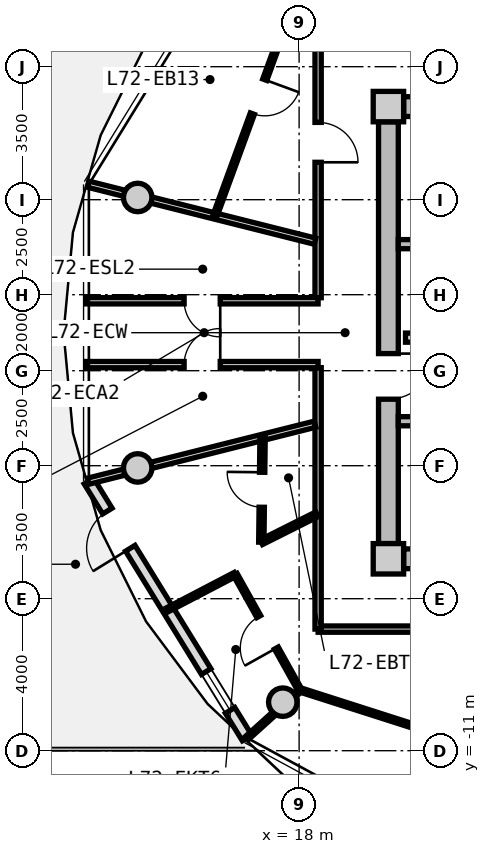
"""IFC4 building model, lengths in metres.
Left out: names, types, materials, properties, quantities, classifications, styles, units other than length and angle.
Written with IfcOpenShell. Run it as: python <this file> out.ifc"""

import sys

from ifc_helpers import new_model, si_unit, direction, frame, frame_2d, origin, origin_2d, place, context, subcontext, project, spatial, rectangle, circle, extrude, source, transform, mapped, element, fill, save


model = new_model("IFC4")
c1 = context("Model", 3, precision=1e-05, world=origin(), true_north=direction((0.0, 1.0)))
c2 = subcontext(c1, "Body", "Model", "MODEL_VIEW")
j1 = project(units=[si_unit("LENGTHUNIT", "METRE"), si_unit("PLANEANGLEUNIT", "RADIAN")], contexts=[c1])
p1 = place(None, origin())
s1 = spatial("IfcSite", under=j1, at=p1, CompositionType="ELEMENT")
p2 = place(p1, origin())
s2 = spatial("IfcBuilding", under=s1, at=p2, CompositionType="ELEMENT")
p3 = place(p2, frame((0.0, 0.0, 232.2)))
s3 = spatial("IfcBuildingStorey", under=s2, at=p3, CompositionType="ELEMENT", Elevation=232.2)
m1 = source(origin(), c2, "Body", "SweptSolid", [
    extrude(rectangle(XDim=0.8, YDim=0.8, at=origin_2d()), origin(), (0.0, 0.0, 1.0), 3.05),
])
for number, where, z_axis, x_axis in (
    (1, (20.35, -5.95, 0.0), (0.0, 0.0, 1.0), (1.0, 0.0, 0.0)),
    (2, (20.35, 5.95, 0.0), (0.0, 0.0, 1.0), (1.0, 0.0, 0.0)),
):
    element("IfcColumn", number, at=place(p3, frame(where, z_axis=z_axis, x_axis=x_axis)), inside=s3, PredefinedType="COLUMN", context=c2, shape_type="MappedRepresentation", body=[
        mapped(m1, transform((0.0, 0.0, 0.0), x_axis=(1.0, 0.0, 0.0), y_axis=(0.0, 1.0, 0.0), z_axis=(0.0, 0.0, 1.0), scale=1.0)),
    ])
m2 = source(origin(), c2, "Body", "SweptSolid", [
    extrude(rectangle(XDim=14.5, YDim=0.52, at=frame_2d((7.25, 0.0))), origin(), (0.0, 0.0, 1.0), 2.81),
])
for number, where, z_axis, x_axis in (
    (3, (20.75, 5.95, 0.0), (0.0, 0.0, 1.0), (1.0, 0.0, 0.0)),
    (4, (35.25, -5.95, 0.0), (0.0, 0.0, 1.0), (-1.0, 0.0, 0.0)),
):
    element("IfcWall", number, at=place(p3, frame(where, z_axis=z_axis, x_axis=x_axis)), inside=s3, PredefinedType="SHEAR", context=c2, shape_type="MappedRepresentation", body=[
        mapped(m2, transform((0.0, 0.0, 0.0), x_axis=(1.0, 0.0, 0.0), y_axis=(0.0, 1.0, 0.0), z_axis=(0.0, 0.0, 1.0), scale=1.0)),
    ])
m3 = source(origin(), c2, "Body", "SweptSolid", [
    extrude(rectangle(XDim=11.1, YDim=0.52, at=frame_2d((5.55, 0.0))), origin(), (0.0, 0.0, 1.0), 2.81),
])
p4 = place(p3, frame((20.35, -5.55, 0.0), z_axis=(0.0, 0.0, 1.0), x_axis=(0.0, 1.0, 0.0)))
e5 = element("IfcWall", 5, at=p4, inside=s3, PredefinedType="SHEAR", context=c2, shape_type="MappedRepresentation", body=[
    mapped(m3, transform((0.0, 0.0, 0.0), x_axis=(1.0, 0.0, 0.0), y_axis=(0.0, 1.0, 0.0), z_axis=(0.0, 0.0, 1.0), scale=1.0)),
])
p5 = place(p4, frame((3.8, 0.0, 0.0)))
e6 = element("IfcOpeningElement", 6, at=p5, cuts=e5, PredefinedType="OPENING", context=c2, shape_type="SweptSolid", body=[
    extrude(rectangle(XDim=1.2, YDim=2.15, at=frame_2d((0.6, 1.075))), frame((0.0, 0.27, 0.0), z_axis=(0.0, -1.0, 0.0), x_axis=(1.0, 0.0, 0.0)), (0.0, 0.0, 1.0), 0.54),
])
m4 = source(origin(), c2, "Body", "SweptSolid", [
    extrude(circle(Radius=0.375, at=origin_2d()), origin(), (0.0, 0.0, 1.0), 3.05),
])
for number, where, z_axis, x_axis in (
    (7, (13.753, 3.559, 0.0), (0.0, 0.0, 1.0), (1.0, 0.0, 0.0)),
    (8, (13.753, -3.559, 0.0), (0.0, 0.0, 1.0), (1.0, 0.0, 0.0)),
    (9, (17.57, -9.723, 0.0), (0.0, 0.0, 1.0), (1.0, 0.0, 0.0)),
):
    element("IfcColumn", number, at=place(p3, frame(where, z_axis=z_axis, x_axis=x_axis)), inside=s3, PredefinedType="COLUMN", context=c2, shape_type="MappedRepresentation", body=[
        mapped(m4, transform((0.0, 0.0, 0.0), x_axis=(1.0, 0.0, 0.0), y_axis=(0.0, 1.0, 0.0), z_axis=(0.0, 0.0, 1.0), scale=1.0)),
    ])
m5 = source(origin(), c2, "Body", "SweptSolid", [
    extrude(rectangle(XDim=7.938, YDim=0.29, at=frame_2d((3.969, 0.0))), origin(), (0.0, 0.0, 1.0), 2.81),
])
p6 = place(p3, frame((16.63, -10.663, 0.0), z_axis=(0.0, 0.0, 1.0), x_axis=(-0.524244987663, 0.851567491694, 0.0)))
e10 = element("IfcWall", 10, at=p6, inside=s3, PredefinedType="SOLIDWALL", context=c2, shape_type="MappedRepresentation", body=[
    mapped(m5, transform((0.0, 0.0, 0.0), x_axis=(1.0, 0.0, 0.0), y_axis=(0.0, 1.0, 0.0), z_axis=(0.0, 0.0, 1.0), scale=1.0)),
])
p7 = place(p6, frame((5.86, 0.0, 0.0)))
e11 = element("IfcOpeningElement", 11, at=p7, cuts=e10, PredefinedType="OPENING", context=c2, shape_type="SweptSolid", body=[
    extrude(rectangle(XDim=1.15, YDim=2.25, at=frame_2d((0.575, 1.125))), frame((0.0, 0.155, 0.0), z_axis=(0.0, -1.0, 0.0), x_axis=(1.0, 0.0, 0.0)), (0.0, 0.0, 1.0), 0.31),
])
p8 = place(p6, frame((0.85, 0.0, 0.85)))
e12 = element("IfcOpeningElement", 12, at=p8, cuts=e10, PredefinedType="OPENING", context=c2, shape_type="SweptSolid", body=[
    extrude(rectangle(XDim=1.2, YDim=1.5, at=frame_2d((0.6, 0.75))), frame((0.0, 0.155, 0.0), z_axis=(0.0, -1.0, 0.0), x_axis=(1.0, 0.0, 0.0)), (0.0, 0.0, 1.0), 0.31),
])
m6 = source(origin(), c2, "Body", "SweptSolid", [
    extrude(rectangle(XDim=7.93, YDim=0.24, at=frame_2d((3.965, 0.0))), origin(), (0.0, 0.0, 1.0), 2.81),
])
p9 = place(p3, frame((20.61, 2.33, 0.0), z_axis=(0.0, 0.0, 1.0), x_axis=(1.0, 0.0, 0.0)))
e13 = element("IfcWall", 13, at=p9, inside=s3, PredefinedType="PARTITIONING", context=c2, shape_type="MappedRepresentation", body=[
    mapped(m6, transform((0.0, 0.0, 0.0), x_axis=(1.0, 0.0, 0.0), y_axis=(0.0, 1.0, 0.0), z_axis=(0.0, 0.0, 1.0), scale=1.0)),
])
p10 = place(p3, frame((20.61, -2.33, 0.0), z_axis=(0.0, 0.0, 1.0), x_axis=(1.0, 0.0, 0.0)))
e14 = element("IfcWall", 14, at=p10, inside=s3, PredefinedType="PARTITIONING", context=c2, shape_type="MappedRepresentation", body=[
    mapped(m6, transform((0.0, 0.0, 0.0), x_axis=(1.0, 0.0, 0.0), y_axis=(0.0, 1.0, 0.0), z_axis=(0.0, 0.0, 1.0), scale=1.0)),
])
p11 = place(p10, frame((1.05, 0.0, 0.0)))
e15 = element("IfcOpeningElement", 15, at=p11, cuts=e14, PredefinedType="OPENING", context=c2, shape_type="SweptSolid", body=[
    extrude(rectangle(XDim=1.1, YDim=2.15, at=frame_2d((0.55, 1.075))), frame((0.0, 0.13, 0.0), z_axis=(0.0, -1.0, 0.0), x_axis=(1.0, 0.0, 0.0)), (0.0, 0.0, 1.0), 0.26),
])
m7 = source(origin(), c2, "Body", "SweptSolid", [
    extrude(rectangle(XDim=7.62, YDim=0.24, at=frame_2d((3.81, 0.0))), origin(), (0.0, 0.0, 1.0), 2.795),
])
p12 = place(p3, frame((20.8, -0.13, 0.0), z_axis=(0.0, 0.0, 1.0), x_axis=(1.0, 0.0, 0.0)))
e16 = element("IfcWall", 16, at=p12, inside=s3, PredefinedType="PARTITIONING", context=c2, shape_type="MappedRepresentation", body=[
    mapped(m7, transform((0.0, 0.0, 0.0), x_axis=(1.0, 0.0, 0.0), y_axis=(0.0, 1.0, 0.0), z_axis=(0.0, 0.0, 1.0), scale=1.0)),
])
p13 = place(p12, frame((6.22, 0.0, 0.0)))
e17 = element("IfcOpeningElement", 17, at=p13, cuts=e16, PredefinedType="OPENING", context=c2, shape_type="SweptSolid", body=[
    extrude(rectangle(XDim=1.0, YDim=2.1, at=frame_2d((0.5, 1.05))), frame((0.0, 0.13, 0.0), z_axis=(0.0, -1.0, 0.0), x_axis=(1.0, 0.0, 0.0)), (0.0, 0.0, 1.0), 0.26),
])
p14 = place(p12, frame((2.4, 0.0, 0.0)))
e18 = element("IfcOpeningElement", 18, at=p14, cuts=e16, PredefinedType="OPENING", context=c2, shape_type="SweptSolid", body=[
    extrude(rectangle(XDim=1.0, YDim=2.1, at=frame_2d((0.5, 1.05))), frame((0.0, 0.13, 0.0), z_axis=(0.0, -1.0, 0.0), x_axis=(1.0, 0.0, 0.0)), (0.0, 0.0, 1.0), 0.26),
])
m8 = source(origin(), c2, "Body", "SweptSolid", [
    extrude(rectangle(XDim=19.0, YDim=0.165, at=frame_2d((9.5, 0.0))), origin(), (0.0, 0.0, 1.0), 2.795),
])
p15 = place(p3, frame((37.5, -7.8, 0.0), z_axis=(0.0, 0.0, 1.0), x_axis=(-1.0, 0.0, 0.0)))
e19 = element("IfcWall", 19, at=p15, inside=s3, PredefinedType="PARTITIONING", context=c2, shape_type="MappedRepresentation", body=[
    mapped(m8, transform((0.0, 0.0, 0.0), x_axis=(1.0, 0.0, 0.0), y_axis=(0.0, 1.0, 0.0), z_axis=(0.0, 0.0, 1.0), scale=1.0)),
])
p16 = place(p15, frame((9.392, 0.0, 0.0)))
e20 = element("IfcOpeningElement", 20, at=p16, cuts=e19, PredefinedType="OPENING", context=c2, shape_type="SweptSolid", body=[
    extrude(rectangle(XDim=1.05, YDim=2.15, at=frame_2d((0.525, 1.075))), frame((0.0, 0.093, 0.0), z_axis=(0.0, -1.0, 0.0), x_axis=(1.0, 0.0, 0.0)), (0.0, 0.0, 1.0), 0.185),
])
m9 = source(origin(), c2, "Body", "SweptSolid", [
    extrude(rectangle(XDim=6.88, YDim=0.165, at=frame_2d((3.44, 0.0))), origin(), (0.0, 0.0, 1.0), 2.795),
])
p17 = place(p3, frame((18.5, -7.8, 0.0), z_axis=(0.0, 0.0, 1.0), x_axis=(0.0, 1.0, 0.0)))
e21 = element("IfcWall", 21, at=p17, inside=s3, PredefinedType="PARTITIONING", context=c2, shape_type="MappedRepresentation", body=[
    mapped(m9, transform((0.0, 0.0, 0.0), x_axis=(1.0, 0.0, 0.0), y_axis=(0.0, 1.0, 0.0), z_axis=(0.0, 0.0, 1.0), scale=1.0)),
])
p18 = place(p3, frame((18.5, 0.92, 0.0), z_axis=(0.0, 0.0, 1.0), x_axis=(0.0, 1.0, 0.0)))
e22 = element("IfcWall", 22, at=p18, inside=s3, PredefinedType="PARTITIONING", context=c2, shape_type="MappedRepresentation", body=[
    mapped(m9, transform((0.0, 0.0, 0.0), x_axis=(1.0, 0.0, 0.0), y_axis=(0.0, 1.0, 0.0), z_axis=(0.0, 0.0, 1.0), scale=1.0)),
])
p19 = place(p18, frame((3.564, 0.0, 0.0)))
e23 = element("IfcOpeningElement", 23, at=p19, cuts=e22, PredefinedType="OPENING", context=c2, shape_type="SweptSolid", body=[
    extrude(rectangle(XDim=1.05, YDim=2.15, at=frame_2d((0.525, 1.075))), frame((0.0, 0.093, 0.0), z_axis=(0.0, -1.0, 0.0), x_axis=(1.0, 0.0, 0.0)), (0.0, 0.0, 1.0), 0.185),
])
m10 = source(origin(), c2, "Body", "SweptSolid", [
    extrude(rectangle(XDim=6.157, YDim=0.165, at=frame_2d((3.079, 0.0))), origin(), (0.0, 0.0, 1.0), 2.395),
])
for number, where, z_axis, x_axis in (
    (24, (18.42, 2.407, 0.0), (0.0, 0.0, 1.0), (-0.97, 0.244, 0.0)),
    (25, (18.42, -2.407, 0.0), (0.0, 0.0, 1.0), (-0.97, -0.244, 0.0)),
):
    element("IfcWall", number, at=place(p3, frame(where, z_axis=z_axis, x_axis=x_axis)), inside=s3, PredefinedType="PARTITIONING", context=c2, shape_type="MappedRepresentation", body=[
        mapped(m10, transform((0.0, 0.0, 0.0), x_axis=(1.0, 0.0, 0.0), y_axis=(0.0, 1.0, 0.0), z_axis=(0.0, 0.0, 1.0), scale=1.0)),
    ])
m11 = source(origin(), c2, "Body", "SweptSolid", [
    extrude(rectangle(XDim=6.101, YDim=0.165, at=frame_2d((3.051, 0.0))), origin(), (0.0, 0.0, 1.0), 2.795),
])
p20 = place(p3, frame((12.399, 0.84, 0.0), z_axis=(0.0, 0.0, 1.0), x_axis=(1.0, 0.0, 0.0)))
e26 = element("IfcWall", 26, at=p20, inside=s3, PredefinedType="PARTITIONING", context=c2, shape_type="MappedRepresentation", body=[
    mapped(m11, transform((0.0, 0.0, 0.0), x_axis=(1.0, 0.0, 0.0), y_axis=(0.0, 1.0, 0.0), z_axis=(0.0, 0.0, 1.0), scale=1.0)),
])
p21 = place(p20, frame((2.576, 0.0, 0.0)))
e27 = element("IfcOpeningElement", 27, at=p21, cuts=e26, PredefinedType="OPENING", context=c2, shape_type="SweptSolid", body=[
    extrude(rectangle(XDim=0.95, YDim=2.1, at=frame_2d((0.475, 1.05))), frame((0.0, 0.093, 0.0), z_axis=(0.0, -1.0, 0.0), x_axis=(1.0, 0.0, 0.0)), (0.0, 0.0, 1.0), 0.185),
])
p22 = place(p3, frame((18.5, -0.84, 0.0), z_axis=(0.0, 0.0, 1.0), x_axis=(-1.0, 0.0, 0.0)))
e28 = element("IfcWall", 28, at=p22, inside=s3, PredefinedType="PARTITIONING", context=c2, shape_type="MappedRepresentation", body=[
    mapped(m11, transform((0.0, 0.0, 0.0), x_axis=(1.0, 0.0, 0.0), y_axis=(0.0, 1.0, 0.0), z_axis=(0.0, 0.0, 1.0), scale=1.0)),
])
p23 = place(p22, frame((2.576, 0.0, 0.0)))
e29 = element("IfcOpeningElement", 29, at=p23, cuts=e28, PredefinedType="OPENING", context=c2, shape_type="SweptSolid", body=[
    extrude(rectangle(XDim=0.95, YDim=2.1, at=frame_2d((0.475, 1.05))), frame((0.0, 0.093, 0.0), z_axis=(0.0, -1.0, 0.0), x_axis=(1.0, 0.0, 0.0)), (0.0, 0.0, 1.0), 0.185),
])
m12 = source(origin(), c2, "Body", "SweptSolid", [
    extrude(rectangle(XDim=6.69, YDim=0.115, at=frame_2d((3.345, 0.0))), origin(), (0.0, 0.0, 1.0), 2.795),
])
p24 = place(p3, frame((18.083, 9.352, 0.0), z_axis=(0.0, 0.0, 1.0), x_axis=(-0.343693784919, -0.939081776102, 0.0)))
e30 = element("IfcWall", 30, at=p24, inside=s3, PredefinedType="PARTITIONING", context=c2, shape_type="MappedRepresentation", body=[
    mapped(m12, transform((0.0, 0.0, 0.0), x_axis=(1.0, 0.0, 0.0), y_axis=(0.0, 1.0, 0.0), z_axis=(0.0, 0.0, 1.0), scale=1.0)),
])
p25 = place(p24, frame((2.87, 0.0, 0.0)))
e31 = element("IfcOpeningElement", 31, at=p25, cuts=e30, PredefinedType="OPENING", context=c2, shape_type="SweptSolid", body=[
    extrude(rectangle(XDim=0.95, YDim=2.1, at=frame_2d((0.475, 1.05))), frame((0.0, 0.067, 0.0), z_axis=(0.0, -1.0, 0.0), x_axis=(1.0, 0.0, 0.0)), (0.0, 0.0, 1.0), 0.135),
])
m13 = source(origin(), c2, "Body", "SweptSolid", [
    extrude(rectangle(XDim=7.024, YDim=0.115, at=frame_2d((3.512, 0.0))), origin(), (0.0, 0.0, 1.0), 2.795),
])
p26 = place(p3, frame((18.03, -9.401, 0.0), z_axis=(0.0, 0.0, 1.0), x_axis=(0.952454006655, -0.304682400552, 0.0)))
e32 = element("IfcWall", 32, at=p26, inside=s3, PredefinedType="PARTITIONING", context=c2, shape_type="MappedRepresentation", body=[
    mapped(m13, transform((0.0, 0.0, 0.0), x_axis=(1.0, 0.0, 0.0), y_axis=(0.0, 1.0, 0.0), z_axis=(0.0, 0.0, 1.0), scale=1.0)),
])
p27 = place(p26, frame((3.037, 0.0, 0.0)))
e33 = element("IfcOpeningElement", 33, at=p27, cuts=e32, PredefinedType="OPENING", context=c2, shape_type="SweptSolid", body=[
    extrude(rectangle(XDim=0.95, YDim=2.1, at=frame_2d((0.475, 1.05))), frame((0.0, 0.067, 0.0), z_axis=(0.0, -1.0, 0.0), x_axis=(1.0, 0.0, 0.0)), (0.0, 0.0, 1.0), 0.135),
])
m14 = source(origin(), c2, "Body", "SweptSolid", [
    extrude(rectangle(XDim=1.905, YDim=0.115, at=frame_2d((0.953, 0.0))), origin(), (0.0, 0.0, 1.0), 2.395),
])
p28 = place(p3, frame((18.03, -9.401, 0.0), z_axis=(0.0, 0.0, 1.0), x_axis=(-0.742624708137, -0.669707804094, 0.0)))
e34 = element("IfcWall", 34, at=p28, inside=s3, PredefinedType="PARTITIONING", context=c2, shape_type="MappedRepresentation", body=[
    mapped(m14, transform((0.0, 0.0, 0.0), x_axis=(1.0, 0.0, 0.0), y_axis=(0.0, 1.0, 0.0), z_axis=(0.0, 0.0, 1.0), scale=1.0)),
])
m15 = source(origin(), c2, "Body", "SweptSolid", [
    extrude(rectangle(XDim=1.638, YDim=0.14, at=frame_2d((0.819, 0.0))), origin(), (0.0, 0.0, 1.0), 2.795),
])
p29 = place(p3, frame((18.47, -4.778, 0.0), z_axis=(0.0, 0.0, 1.0), x_axis=(-0.893919977945, -0.448226586707, 0.0)))
e35 = element("IfcWall", 35, at=p29, inside=s3, PredefinedType="PARTITIONING", context=c2, shape_type="MappedRepresentation", body=[
    mapped(m15, transform((0.0, 0.0, 0.0), x_axis=(1.0, 0.0, 0.0), y_axis=(0.0, 1.0, 0.0), z_axis=(0.0, 0.0, 1.0), scale=1.0)),
])
m16 = source(origin(), c2, "Body", "SweptSolid", [
    extrude(rectangle(XDim=2.759, YDim=0.14, at=frame_2d((1.379, 0.0))), origin(), (0.0, 0.0, 1.0), 2.795),
])
p30 = place(p3, frame((17.005, -5.513, 0.0), z_axis=(0.0, 0.0, 1.0), x_axis=(0.01194710728, 0.999928630767, 0.0)))
e36 = element("IfcWall", 36, at=p30, inside=s3, PredefinedType="PARTITIONING", context=c2, shape_type="MappedRepresentation", body=[
    mapped(m16, transform((0.0, 0.0, 0.0), x_axis=(1.0, 0.0, 0.0), y_axis=(0.0, 1.0, 0.0), z_axis=(0.0, 0.0, 1.0), scale=1.0)),
])
p31 = place(p30, frame((0.919, 0.0, 0.0)))
e37 = element("IfcOpeningElement", 37, at=p31, cuts=e36, PredefinedType="OPENING", context=c2, shape_type="SweptSolid", body=[
    extrude(rectangle(XDim=0.92, YDim=2.1, at=frame_2d((0.46, 1.05))), frame((0.0, 0.08, 0.0), z_axis=(0.0, -1.0, 0.0), x_axis=(1.0, 0.0, 0.0)), (0.0, 0.0, 1.0), 0.16),
])
m17 = source(origin(), c2, "Body", "SweptSolid", [
    extrude(rectangle(XDim=2.015, YDim=0.115, at=frame_2d((1.007, 0.0))), origin(), (0.0, 0.0, 1.0), 2.795),
])
p32 = place(p3, frame((16.318, -6.36, 0.0), z_axis=(0.0, 0.0, 1.0), x_axis=(-0.886437892009, -0.462847559797, 0.0)))
e38 = element("IfcWall", 38, at=p32, inside=s3, PredefinedType="PARTITIONING", context=c2, shape_type="MappedRepresentation", body=[
    mapped(m17, transform((0.0, 0.0, 0.0), x_axis=(1.0, 0.0, 0.0), y_axis=(0.0, 1.0, 0.0), z_axis=(0.0, 0.0, 1.0), scale=1.0)),
])
m18 = source(origin(), c2, "Body", "SweptSolid", [
    extrude(rectangle(XDim=3.493, YDim=0.115, at=frame_2d((1.746, 0.0))), origin(), (0.0, 0.0, 1.0), 2.795),
])
p33 = place(p3, frame((16.318, -6.36, 0.0), z_axis=(0.0, 0.0, 1.0), x_axis=(0.487896553961, -0.872901456427, 0.0)))
e39 = element("IfcWall", 39, at=p33, inside=s3, PredefinedType="PARTITIONING", context=c2, shape_type="MappedRepresentation", body=[
    mapped(m18, transform((0.0, 0.0, 0.0), x_axis=(1.0, 0.0, 0.0), y_axis=(0.0, 1.0, 0.0), z_axis=(0.0, 0.0, 1.0), scale=1.0)),
])
p34 = place(p33, frame((1.271, 0.0, 0.0)))
e40 = element("IfcOpeningElement", 40, at=p34, cuts=e39, PredefinedType="OPENING", context=c2, shape_type="SweptSolid", body=[
    extrude(rectangle(XDim=0.95, YDim=2.1, at=frame_2d((0.475, 1.05))), frame((0.0, 0.067, 0.0), z_axis=(0.0, -1.0, 0.0), x_axis=(1.0, 0.0, 0.0)), (0.0, 0.0, 1.0), 0.135),
])
m19 = source(origin(), c2, "Body", "SweptSolid", [
    extrude(rectangle(XDim=1.15, YDim=2.25, at=frame_2d((0.575, 1.125))), frame((0.0, 0.025, 0.0), z_axis=(0.0, -1.0, 0.0), x_axis=(1.0, 0.0, 0.0)), (0.0, 0.0, 1.0), 0.05),
])
p35 = place(p7, origin())
e41 = element("IfcDoor", 41, at=p35, inside=s3, OperationType="SINGLE_SWING_LEFT", PredefinedType="DOOR", context=c2, shape_type="MappedRepresentation", body=[
    mapped(m19, transform((0.0, 0.0, 0.0), x_axis=(1.0, 0.0, 0.0), y_axis=(0.0, 1.0, 0.0), z_axis=(0.0, 0.0, 1.0), scale=1.0)),
])
fill(e11, e41)
m20 = source(origin(), c2, "Body", "SweptSolid", [
    extrude(rectangle(XDim=1.2, YDim=1.5, at=frame_2d((0.6, 0.75))), frame((0.0, 0.03, 0.0), z_axis=(0.0, -1.0, 0.0), x_axis=(1.0, 0.0, 0.0)), (0.0, 0.0, 1.0), 0.06),
])
p36 = place(p8, origin())
e42 = element("IfcWindow", 42, at=p36, inside=s3, PartitioningType="SINGLE_PANEL", PredefinedType="WINDOW", context=c2, shape_type="MappedRepresentation", body=[
    mapped(m20, transform((0.0, 0.0, 0.0), x_axis=(1.0, 0.0, 0.0), y_axis=(0.0, 1.0, 0.0), z_axis=(0.0, 0.0, 1.0), scale=1.0)),
])
fill(e12, e42)
m21 = source(origin(), c2, "Body", "SweptSolid", [
    extrude(rectangle(XDim=1.2, YDim=2.15, at=frame_2d((0.6, 1.075))), frame((0.0, 0.025, 0.0), z_axis=(0.0, -1.0, 0.0), x_axis=(1.0, 0.0, 0.0)), (0.0, 0.0, 1.0), 0.05),
])
p37 = place(p5, frame((1.2, 0.0, 0.0), z_axis=(0.0, 0.0, 1.0), x_axis=(-1.0, 0.0, 0.0)))
e43 = element("IfcDoor", 43, at=p37, inside=s3, OperationType="SINGLE_SWING_LEFT", PredefinedType="DOOR", context=c2, shape_type="MappedRepresentation", body=[
    mapped(m21, transform((0.0, 0.0, 0.0), x_axis=(1.0, 0.0, 0.0), y_axis=(0.0, 1.0, 0.0), z_axis=(0.0, 0.0, 1.0), scale=1.0)),
])
fill(e6, e43)
m22 = source(origin(), c2, "Body", "SweptSolid", [
    extrude(rectangle(XDim=0.95, YDim=2.1, at=frame_2d((0.475, 1.05))), frame((0.0, 0.025, 0.0), z_axis=(0.0, -1.0, 0.0), x_axis=(1.0, 0.0, 0.0)), (0.0, 0.0, 1.0), 0.05),
])
p38 = place(p23, frame((0.95, 0.0, 0.0), z_axis=(0.0, 0.0, 1.0), x_axis=(-1.0, 0.0, 0.0)))
e44 = element("IfcDoor", 44, at=p38, inside=s3, OperationType="SINGLE_SWING_RIGHT", PredefinedType="DOOR", context=c2, shape_type="MappedRepresentation", body=[
    mapped(m22, transform((0.0, 0.0, 0.0), x_axis=(1.0, 0.0, 0.0), y_axis=(0.0, 1.0, 0.0), z_axis=(0.0, 0.0, 1.0), scale=1.0)),
])
fill(e29, e44)
p39 = place(p21, frame((0.95, 0.0, 0.0), z_axis=(0.0, 0.0, 1.0), x_axis=(-1.0, 0.0, 0.0)))
e45 = element("IfcDoor", 45, at=p39, inside=s3, OperationType="SINGLE_SWING_LEFT", PredefinedType="DOOR", context=c2, shape_type="MappedRepresentation", body=[
    mapped(m22, transform((0.0, 0.0, 0.0), x_axis=(1.0, 0.0, 0.0), y_axis=(0.0, 1.0, 0.0), z_axis=(0.0, 0.0, 1.0), scale=1.0)),
])
fill(e27, e45)
m23 = source(origin(), c2, "Body", "SweptSolid", [
    extrude(rectangle(XDim=1.05, YDim=2.15, at=frame_2d((0.525, 1.075))), frame((0.0, 0.025, 0.0), z_axis=(0.0, -1.0, 0.0), x_axis=(1.0, 0.0, 0.0)), (0.0, 0.0, 1.0), 0.05),
])
p40 = place(p19, frame((1.05, 0.0, 0.0), z_axis=(0.0, 0.0, 1.0), x_axis=(-1.0, 0.0, 0.0)))
e46 = element("IfcDoor", 46, at=p40, inside=s3, OperationType="SINGLE_SWING_RIGHT", PredefinedType="DOOR", context=c2, shape_type="MappedRepresentation", body=[
    mapped(m23, transform((0.0, 0.0, 0.0), x_axis=(1.0, 0.0, 0.0), y_axis=(0.0, 1.0, 0.0), z_axis=(0.0, 0.0, 1.0), scale=1.0)),
])
fill(e23, e46)
p41 = place(p25, origin())
e47 = element("IfcDoor", 47, at=p41, inside=s3, OperationType="SINGLE_SWING_LEFT", PredefinedType="DOOR", context=c2, shape_type="MappedRepresentation", body=[
    mapped(m22, transform((0.0, 0.0, 0.0), x_axis=(1.0, 0.0, 0.0), y_axis=(0.0, 1.0, 0.0), z_axis=(0.0, 0.0, 1.0), scale=1.0)),
])
fill(e31, e47)
m24 = source(origin(), c2, "Body", "SweptSolid", [
    extrude(rectangle(XDim=0.92, YDim=2.1, at=frame_2d((0.46, 1.05))), frame((0.0, 0.025, 0.0), z_axis=(0.0, -1.0, 0.0), x_axis=(1.0, 0.0, 0.0)), (0.0, 0.0, 1.0), 0.05),
])
p42 = place(p31, origin())
e48 = element("IfcDoor", 48, at=p42, inside=s3, OperationType="SINGLE_SWING_RIGHT", PredefinedType="DOOR", context=c2, shape_type="MappedRepresentation", body=[
    mapped(m24, transform((0.0, 0.0, 0.0), x_axis=(1.0, 0.0, 0.0), y_axis=(0.0, 1.0, 0.0), z_axis=(0.0, 0.0, 1.0), scale=1.0)),
])
fill(e37, e48)
p43 = place(p34, frame((0.95, 0.0, 0.0), z_axis=(0.0, 0.0, 1.0), x_axis=(-1.0, 0.0, 0.0)))
e49 = element("IfcDoor", 49, at=p43, inside=s3, OperationType="SINGLE_SWING_LEFT", PredefinedType="DOOR", context=c2, shape_type="MappedRepresentation", body=[
    mapped(m22, transform((0.0, 0.0, 0.0), x_axis=(1.0, 0.0, 0.0), y_axis=(0.0, 1.0, 0.0), z_axis=(0.0, 0.0, 1.0), scale=1.0)),
])
fill(e40, e49)
p44 = place(p27, origin())
e50 = element("IfcDoor", 50, at=p44, inside=s3, OperationType="SINGLE_SWING_RIGHT", PredefinedType="DOOR", context=c2, shape_type="MappedRepresentation", body=[
    mapped(m22, transform((0.0, 0.0, 0.0), x_axis=(1.0, 0.0, 0.0), y_axis=(0.0, 1.0, 0.0), z_axis=(0.0, 0.0, 1.0), scale=1.0)),
])
fill(e33, e50)
save(model, sys.argv[1])
